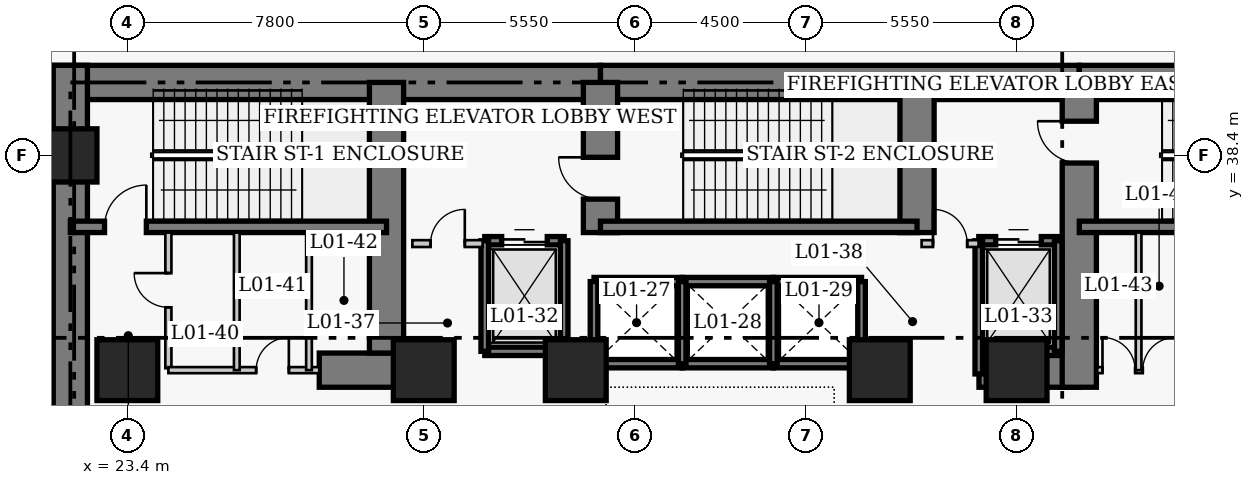
"""IFC4 building model, lengths in metres.
Left out: names, types, materials, properties, quantities, classifications, styles, units other than length and angle.
Written with IfcOpenShell. Run it as: python <this file> out.ifc"""

import sys

from ifc_helpers import new_model, si_unit, direction, frame, frame_2d, origin, origin_2d, place, context, subcontext, project, spatial, rectangle, extrude, element, fill, save


model = new_model("IFC4")
c1 = context("Model", 3, precision=1e-05, world=origin(), true_north=direction((0.0, 1.0)))
c2 = subcontext(c1, "Body", "Model", "MODEL_VIEW")
j1 = project(units=[si_unit("LENGTHUNIT", "METRE"), si_unit("PLANEANGLEUNIT", "RADIAN")], contexts=[c1])
p1 = place(None, origin())
s1 = spatial("IfcSite", under=j1, at=p1, CompositionType="ELEMENT")
p2 = place(p1, origin())
s2 = spatial("IfcBuilding", under=s1, at=p2, CompositionType="ELEMENT")
p3 = place(p2, frame((0.0, 0.0, 5.4)))
s3 = spatial("IfcBuildingStorey", under=s2, at=p3, CompositionType="ELEMENT", Elevation=5.4)
p4 = place(p3, frame((21.45, 40.32, 0.0), z_axis=(0.0, 0.0, 1.0), x_axis=(1.0, 0.0, 0.0)))
e1 = element("IfcWall", 1, at=p4, inside=s3, PredefinedType="SHEAR", context=c2, shape_type="SweptSolid", body=[
    extrude(rectangle(XDim=14.4, YDim=0.9, at=frame_2d((7.2, 0.0))), origin(), (0.0, 0.0, 1.0), 5.0),
])
p5 = place(p3, frame((35.85, 40.32, 0.0), z_axis=(0.0, 0.0, 1.0), x_axis=(1.0, 0.0, 0.0)))
e2 = element("IfcWall", 2, at=p5, inside=s3, PredefinedType="SHEAR", context=c2, shape_type="SweptSolid", body=[
    extrude(rectangle(XDim=12.6, YDim=0.9, at=frame_2d((6.3, 0.0))), origin(), (0.0, 0.0, 1.0), 5.0),
])
p6 = place(p3, frame((48.45, 40.32, 0.0), z_axis=(0.0, 0.0, 1.0), x_axis=(1.0, 0.0, 0.0)))
e3 = element("IfcWall", 3, at=p6, inside=s3, PredefinedType="SHEAR", context=c2, shape_type="SweptSolid", body=[
    extrude(rectangle(XDim=8.97, YDim=0.9, at=frame_2d((4.485, 0.0))), origin(), (0.0, 0.0, 1.0), 5.0),
])
p7 = place(p3, frame((21.9, 27.05, 0.0), z_axis=(0.0, 0.0, 1.0), x_axis=(0.0, 1.0, 0.0)))
e4 = element("IfcWall", 4, at=p7, inside=s3, PredefinedType="SHEAR", context=c2, shape_type="SweptSolid", body=[
    extrude(rectangle(XDim=13.72, YDim=0.9, at=frame_2d((6.86, 0.0))), origin(), (0.0, 0.0, 1.0), 5.0),
])
p8 = place(p3, frame((28.45, 32.75, 0.0), z_axis=(0.0, 0.0, 1.0), x_axis=(1.0, 0.0, 0.0)))
e5 = element("IfcWall", 5, at=p8, inside=s3, PredefinedType="SHEAR", context=c2, shape_type="SweptSolid", body=[
    extrude(rectangle(XDim=2.4, YDim=0.9, at=frame_2d((1.2, 0.0))), origin(), (0.0, 0.0, 1.0), 5.0),
])
p9 = place(p3, frame((45.81, 32.75, 0.0), z_axis=(0.0, 0.0, 1.0), x_axis=(1.0, 0.0, 0.0)))
e6 = element("IfcWall", 6, at=p9, inside=s3, PredefinedType="SHEAR", context=c2, shape_type="SweptSolid", body=[
    extrude(rectangle(XDim=2.64, YDim=0.9, at=frame_2d((1.32, 0.0))), origin(), (0.0, 0.0, 1.0), 5.0),
])
p10 = place(p3, frame((30.22, 33.2, 0.0), z_axis=(0.0, 0.0, 1.0), x_axis=(0.0, 1.0, 0.0)))
e7 = element("IfcWall", 7, at=p10, inside=s3, PredefinedType="SHEAR", context=c2, shape_type="SweptSolid", body=[
    extrude(rectangle(XDim=7.12, YDim=0.9, at=frame_2d((3.56, 0.0))), origin(), (0.0, 0.0, 1.0), 5.0),
])
p11 = place(p3, frame((35.85, 36.37, 0.0), z_axis=(0.0, 0.0, 1.0), x_axis=(0.0, 1.0, 0.0)))
e8 = element("IfcWall", 8, at=p11, inside=s3, PredefinedType="SHEAR", context=c2, shape_type="SweptSolid", body=[
    extrude(rectangle(XDim=3.95, YDim=0.9, at=frame_2d((1.975, 0.0))), origin(), (0.0, 0.0, 1.0), 5.0),
])
p12 = place(p11, frame((0.88, 0.0, 0.0)))
e9 = element("IfcOpeningElement", 9, at=p12, cuts=e8, PredefinedType="OPENING", context=c2, shape_type="SweptSolid", body=[
    extrude(rectangle(XDim=1.1, YDim=2.15, at=frame_2d((0.55, 1.075))), frame((0.0, 0.46, 0.0), z_axis=(0.0, -1.0, 0.0), x_axis=(1.0, 0.0, 0.0)), (0.0, 0.0, 1.0), 0.92),
])
p13 = place(p3, frame((44.18, 36.37, 0.0), z_axis=(0.0, 0.0, 1.0), x_axis=(0.0, 1.0, 0.0)))
e10 = element("IfcWall", 10, at=p13, inside=s3, PredefinedType="SHEAR", context=c2, shape_type="SweptSolid", body=[
    extrude(rectangle(XDim=3.95, YDim=0.9, at=frame_2d((1.975, 0.0))), origin(), (0.0, 0.0, 1.0), 5.0),
])
p14 = place(p3, frame((48.45, 32.3, 0.0), z_axis=(0.0, 0.0, 1.0), x_axis=(0.0, 1.0, 0.0)))
e11 = element("IfcWall", 11, at=p14, inside=s3, PredefinedType="SHEAR", context=c2, shape_type="SweptSolid", body=[
    extrude(rectangle(XDim=8.02, YDim=0.9, at=frame_2d((4.01, 0.0))), origin(), (0.0, 0.0, 1.0), 5.0),
])
p15 = place(p14, frame((5.9, 0.0, 0.0)))
e12 = element("IfcOpeningElement", 12, at=p15, cuts=e11, PredefinedType="OPENING", context=c2, shape_type="SweptSolid", body=[
    extrude(rectangle(XDim=1.1, YDim=2.15, at=frame_2d((0.55, 1.075))), frame((0.0, 0.46, 0.0), z_axis=(0.0, -1.0, 0.0), x_axis=(1.0, 0.0, 0.0)), (0.0, 0.0, 1.0), 0.92),
])
p16 = place(p3, frame((21.9, 36.52, 0.0), z_axis=(0.0, 0.0, 1.0), x_axis=(1.0, 0.0, 0.0)))
e13 = element("IfcWall", 13, at=p16, inside=s3, PredefinedType="SHEAR", context=c2, shape_type="SweptSolid", body=[
    extrude(rectangle(XDim=8.32, YDim=0.3, at=frame_2d((4.16, 0.0))), origin(), (0.0, 0.0, 1.0), 5.0),
])
p17 = place(p16, frame((0.9, 0.0, 0.0)))
e14 = element("IfcOpeningElement", 14, at=p17, cuts=e13, PredefinedType="OPENING", context=c2, shape_type="SweptSolid", body=[
    extrude(rectangle(XDim=1.1, YDim=2.15, at=frame_2d((0.55, 1.075))), frame((0.0, 0.16, 0.0), z_axis=(0.0, -1.0, 0.0), x_axis=(1.0, 0.0, 0.0)), (0.0, 0.0, 1.0), 0.32),
])
p18 = place(p3, frame((35.85, 36.52, 0.0), z_axis=(0.0, 0.0, 1.0), x_axis=(1.0, 0.0, 0.0)))
e15 = element("IfcWall", 15, at=p18, inside=s3, PredefinedType="SHEAR", context=c2, shape_type="SweptSolid", body=[
    extrude(rectangle(XDim=8.33, YDim=0.3, at=frame_2d((4.165, 0.0))), origin(), (0.0, 0.0, 1.0), 5.0),
])
p19 = place(p3, frame((48.45, 36.52, 0.0), z_axis=(0.0, 0.0, 1.0), x_axis=(1.0, 0.0, 0.0)))
e16 = element("IfcWall", 16, at=p19, inside=s3, PredefinedType="SHEAR", context=c2, shape_type="SweptSolid", body=[
    extrude(rectangle(XDim=8.52, YDim=0.3, at=frame_2d((4.26, 0.0))), origin(), (0.0, 0.0, 1.0), 5.0),
])
p20 = place(p3, frame((21.9, 38.4, 0.0), z_axis=(0.0, 0.0, 1.0), x_axis=(1.0, 0.0, 0.0)))
e17 = element("IfcColumn", 17, at=p20, inside=s3, PredefinedType="COLUMN", context=c2, shape_type="SweptSolid", body=[
    extrude(rectangle(XDim=1.4, YDim=1.4, at=origin_2d()), origin(), (0.0, 0.0, 1.0), 5.0),
])
for number, where, z_axis, x_axis in (
    (18, (23.4, 32.75, 0.0), (0.0, 0.0, 1.0), (1.0, 0.0, 0.0)),
    (19, (31.2, 32.75, 0.0), (0.0, 0.0, 1.0), (1.0, 0.0, 0.0)),
    (20, (35.2, 32.75, 0.0), (0.0, 0.0, 1.0), (1.0, 0.0, 0.0)),
    (21, (43.2, 32.75, 0.0), (0.0, 0.0, 1.0), (1.0, 0.0, 0.0)),
    (22, (46.8, 32.75, 0.0), (0.0, 0.0, 1.0), (1.0, 0.0, 0.0)),
):
    element("IfcColumn", number, at=place(p3, frame(where, z_axis=z_axis, x_axis=x_axis)), inside=s3, PredefinedType="COLUMN", context=c2, shape_type="SweptSolid", body=[
        extrude(rectangle(XDim=1.6, YDim=1.6, at=origin_2d()), origin(), (0.0, 0.0, 1.0), 5.0),
    ])
for number, where, z_axis, x_axis in (
    (23, (35.68, 35.08, 0.0), (0.0, 0.0, 1.0), (1.0, 0.0, 0.0)),
    (24, (35.68, 32.92, 0.0), (0.0, 0.0, 1.0), (1.0, 0.0, 0.0)),
):
    element("IfcWall", number, at=place(p3, frame(where, z_axis=z_axis, x_axis=x_axis)), inside=s3, PredefinedType="SHEAR", context=c2, shape_type="SweptSolid", body=[
        extrude(rectangle(XDim=2.32, YDim=0.22, at=frame_2d((1.16, 0.0))), origin(), (0.0, 0.0, 1.0), 5.0),
    ])
p21 = place(p3, frame((35.68, 32.92, 0.0), z_axis=(0.0, 0.0, 1.0), x_axis=(0.0, 1.0, 0.0)))
e25 = element("IfcWall", 25, at=p21, inside=s3, PredefinedType="SHEAR", context=c2, shape_type="SweptSolid", body=[
    extrude(rectangle(XDim=2.16, YDim=0.2, at=frame_2d((1.08, 0.0))), origin(), (0.0, 0.0, 1.0), 5.0),
])
for number, where, z_axis, x_axis in (
    (26, (38.0, 35.08, 0.0), (0.0, 0.0, 1.0), (1.0, 0.0, 0.0)),
    (27, (38.0, 32.92, 0.0), (0.0, 0.0, 1.0), (1.0, 0.0, 0.0)),
):
    element("IfcWall", number, at=place(p3, frame(where, z_axis=z_axis, x_axis=x_axis)), inside=s3, PredefinedType="SHEAR", context=c2, shape_type="SweptSolid", body=[
        extrude(rectangle(XDim=2.4, YDim=0.22, at=frame_2d((1.2, 0.0))), origin(), (0.0, 0.0, 1.0), 5.0),
    ])
p22 = place(p3, frame((38.0, 32.92, 0.0), z_axis=(0.0, 0.0, 1.0), x_axis=(0.0, 1.0, 0.0)))
e28 = element("IfcWall", 28, at=p22, inside=s3, PredefinedType="SHEAR", context=c2, shape_type="SweptSolid", body=[
    extrude(rectangle(XDim=2.16, YDim=0.2, at=frame_2d((1.08, 0.0))), origin(), (0.0, 0.0, 1.0), 5.0),
])
for number, where, z_axis, x_axis in (
    (29, (40.4, 35.08, 0.0), (0.0, 0.0, 1.0), (1.0, 0.0, 0.0)),
    (30, (40.4, 32.92, 0.0), (0.0, 0.0, 1.0), (1.0, 0.0, 0.0)),
):
    element("IfcWall", number, at=place(p3, frame(where, z_axis=z_axis, x_axis=x_axis)), inside=s3, PredefinedType="SHEAR", context=c2, shape_type="SweptSolid", body=[
        extrude(rectangle(XDim=2.32, YDim=0.22, at=frame_2d((1.16, 0.0))), origin(), (0.0, 0.0, 1.0), 5.0),
    ])
for number, where, z_axis, x_axis in (
    (31, (40.4, 32.92, 0.0), (0.0, 0.0, 1.0), (0.0, 1.0, 0.0)),
    (32, (42.72, 32.92, 0.0), (0.0, 0.0, 1.0), (0.0, 1.0, 0.0)),
):
    element("IfcWall", number, at=place(p3, frame(where, z_axis=z_axis, x_axis=x_axis)), inside=s3, PredefinedType="SHEAR", context=c2, shape_type="SweptSolid", body=[
        extrude(rectangle(XDim=2.16, YDim=0.2, at=frame_2d((1.08, 0.0))), origin(), (0.0, 0.0, 1.0), 5.0),
    ])
p23 = place(p3, frame((32.805, 36.155, 0.0), z_axis=(0.0, 0.0, 1.0), x_axis=(1.0, 0.0, 0.0)))
e33 = element("IfcWall", 33, at=p23, inside=s3, PredefinedType="SHEAR", context=c2, shape_type="SweptSolid", body=[
    extrude(rectangle(XDim=2.09, YDim=0.22, at=frame_2d((1.045, 0.0))), origin(), (0.0, 0.0, 1.0), 5.0),
])
p24 = place(p23, frame((0.445, 0.0, 0.0)))
e34 = element("IfcOpeningElement", 34, at=p24, cuts=e33, PredefinedType="OPENING", context=c2, shape_type="SweptSolid", body=[
    extrude(rectangle(XDim=1.2, YDim=2.15, at=frame_2d((0.6, 1.075))), frame((0.0, 0.12, 0.0), z_axis=(0.0, -1.0, 0.0), x_axis=(1.0, 0.0, 0.0)), (0.0, 0.0, 1.0), 0.24),
])
p25 = place(p3, frame((32.805, 33.245, 0.0), z_axis=(0.0, 0.0, 1.0), x_axis=(1.0, 0.0, 0.0)))
e35 = element("IfcWall", 35, at=p25, inside=s3, PredefinedType="SHEAR", context=c2, shape_type="SweptSolid", body=[
    extrude(rectangle(XDim=2.09, YDim=0.22, at=frame_2d((1.045, 0.0))), origin(), (0.0, 0.0, 1.0), 5.0),
])
for number, where, z_axis, x_axis in (
    (36, (32.805, 33.245, 0.0), (0.0, 0.0, 1.0), (0.0, 1.0, 0.0)),
    (37, (34.895, 33.245, 0.0), (0.0, 0.0, 1.0), (0.0, 1.0, 0.0)),
):
    element("IfcWall", number, at=place(p3, frame(where, z_axis=z_axis, x_axis=x_axis)), inside=s3, PredefinedType="SHEAR", context=c2, shape_type="SweptSolid", body=[
        extrude(rectangle(XDim=2.91, YDim=0.2, at=frame_2d((1.455, 0.0))), origin(), (0.0, 0.0, 1.0), 5.0),
    ])
p26 = place(p3, frame((45.805, 36.155, 0.0), z_axis=(0.0, 0.0, 1.0), x_axis=(1.0, 0.0, 0.0)))
e38 = element("IfcWall", 38, at=p26, inside=s3, PredefinedType="SHEAR", context=c2, shape_type="SweptSolid", body=[
    extrude(rectangle(XDim=2.09, YDim=0.22, at=frame_2d((1.045, 0.0))), origin(), (0.0, 0.0, 1.0), 5.0),
])
p27 = place(p26, frame((0.445, 0.0, 0.0)))
e39 = element("IfcOpeningElement", 39, at=p27, cuts=e38, PredefinedType="OPENING", context=c2, shape_type="SweptSolid", body=[
    extrude(rectangle(XDim=1.2, YDim=2.15, at=frame_2d((0.6, 1.075))), frame((0.0, 0.12, 0.0), z_axis=(0.0, -1.0, 0.0), x_axis=(1.0, 0.0, 0.0)), (0.0, 0.0, 1.0), 0.24),
])
p28 = place(p3, frame((45.805, 33.245, 0.0), z_axis=(0.0, 0.0, 1.0), x_axis=(1.0, 0.0, 0.0)))
e40 = element("IfcWall", 40, at=p28, inside=s3, PredefinedType="SHEAR", context=c2, shape_type="SweptSolid", body=[
    extrude(rectangle(XDim=2.09, YDim=0.22, at=frame_2d((1.045, 0.0))), origin(), (0.0, 0.0, 1.0), 5.0),
])
p29 = place(p3, frame((45.805, 32.65, 0.0), z_axis=(0.0, 0.0, 1.0), x_axis=(0.0, 1.0, 0.0)))
e41 = element("IfcWall", 41, at=p29, inside=s3, PredefinedType="SHEAR", context=c2, shape_type="SweptSolid", body=[
    extrude(rectangle(XDim=3.505, YDim=0.2, at=frame_2d((1.752, 0.0))), origin(), (0.0, 0.0, 1.0), 5.0),
])
p30 = place(p3, frame((47.895, 33.245, 0.0), z_axis=(0.0, 0.0, 1.0), x_axis=(0.0, 1.0, 0.0)))
e42 = element("IfcWall", 42, at=p30, inside=s3, PredefinedType="SHEAR", context=c2, shape_type="SweptSolid", body=[
    extrude(rectangle(XDim=2.91, YDim=0.2, at=frame_2d((1.455, 0.0))), origin(), (0.0, 0.0, 1.0), 5.0),
])
p31 = place(p3, frame((30.9, 36.08, 0.0), z_axis=(0.0, 0.0, 1.0), x_axis=(1.0, 0.0, 0.0)))
e43 = element("IfcWall", 43, at=p31, inside=s3, PredefinedType="PARTITIONING", context=c2, shape_type="SweptSolid", body=[
    extrude(rectangle(XDim=1.85, YDim=0.18, at=frame_2d((0.925, 0.0))), origin(), (0.0, 0.0, 1.0), 4.65),
])
p32 = place(p31, frame((0.48, 0.0, 0.0)))
e44 = element("IfcOpeningElement", 44, at=p32, cuts=e43, PredefinedType="OPENING", context=c2, shape_type="SweptSolid", body=[
    extrude(rectangle(XDim=0.9, YDim=2.15, at=frame_2d((0.45, 1.075))), frame((0.0, 0.1, 0.0), z_axis=(0.0, -1.0, 0.0), x_axis=(1.0, 0.0, 0.0)), (0.0, 0.0, 1.0), 0.2),
])
p33 = place(p3, frame((44.3, 36.08, 0.0), z_axis=(0.0, 0.0, 1.0), x_axis=(1.0, 0.0, 0.0)))
e45 = element("IfcWall", 45, at=p33, inside=s3, PredefinedType="PARTITIONING", context=c2, shape_type="SweptSolid", body=[
    extrude(rectangle(XDim=1.5, YDim=0.18, at=frame_2d((0.75, 0.0))), origin(), (0.0, 0.0, 1.0), 4.65),
])
p34 = place(p33, frame((0.3, 0.0, 0.0)))
e46 = element("IfcOpeningElement", 46, at=p34, cuts=e45, PredefinedType="OPENING", context=c2, shape_type="SweptSolid", body=[
    extrude(rectangle(XDim=0.9, YDim=2.15, at=frame_2d((0.45, 1.075))), frame((0.0, 0.1, 0.0), z_axis=(0.0, -1.0, 0.0), x_axis=(1.0, 0.0, 0.0)), (0.0, 0.0, 1.0), 0.2),
])
p35 = place(p3, frame((24.48, 32.8, 0.0), z_axis=(0.0, 0.0, 1.0), x_axis=(0.0, 1.0, 0.0)))
e47 = element("IfcWall", 47, at=p35, inside=s3, PredefinedType="PARTITIONING", context=c2, shape_type="SweptSolid", body=[
    extrude(rectangle(XDim=3.57, YDim=0.16, at=frame_2d((1.785, 0.0))), origin(), (0.0, 0.0, 1.0), 4.65),
])
p36 = place(p35, frame((1.604, 0.0, 0.0)))
e48 = element("IfcOpeningElement", 48, at=p36, cuts=e47, PredefinedType="OPENING", context=c2, shape_type="SweptSolid", body=[
    extrude(rectangle(XDim=0.9, YDim=2.1, at=frame_2d((0.45, 1.05))), frame((0.0, 0.09, 0.0), z_axis=(0.0, -1.0, 0.0), x_axis=(1.0, 0.0, 0.0)), (0.0, 0.0, 1.0), 0.18),
])
p37 = place(p3, frame((24.48, 32.75, 0.0), z_axis=(0.0, 0.0, 1.0), x_axis=(1.0, 0.0, 0.0)))
e49 = element("IfcWall", 49, at=p37, inside=s3, PredefinedType="PARTITIONING", context=c2, shape_type="SweptSolid", body=[
    extrude(rectangle(XDim=3.97, YDim=0.16, at=frame_2d((1.985, 0.0))), origin(), (0.0, 0.0, 1.0), 4.65),
])
p38 = place(p37, frame((2.31, 0.0, 0.0)))
e50 = element("IfcOpeningElement", 50, at=p38, cuts=e49, PredefinedType="OPENING", context=c2, shape_type="SweptSolid", body=[
    extrude(rectangle(XDim=0.86, YDim=2.05, at=frame_2d((0.43, 1.025))), frame((0.0, 0.09, 0.0), z_axis=(0.0, -1.0, 0.0), x_axis=(1.0, 0.0, 0.0)), (0.0, 0.0, 1.0), 0.18),
])
p39 = place(p3, frame((48.92, 32.75, 0.0), z_axis=(0.0, 0.0, 1.0), x_axis=(1.0, 0.0, 0.0)))
e51 = element("IfcWall", 51, at=p39, inside=s3, PredefinedType="PARTITIONING", context=c2, shape_type="SweptSolid", body=[
    extrude(rectangle(XDim=2.2, YDim=0.16, at=frame_2d((1.1, 0.0))), origin(), (0.0, 0.0, 1.0), 4.65),
])
p40 = place(p39, frame((0.14, 0.0, 0.0)))
e52 = element("IfcOpeningElement", 52, at=p40, cuts=e51, PredefinedType="OPENING", context=c2, shape_type="SweptSolid", body=[
    extrude(rectangle(XDim=0.86, YDim=2.05, at=frame_2d((0.43, 1.025))), frame((0.0, 0.09, 0.0), z_axis=(0.0, -1.0, 0.0), x_axis=(1.0, 0.0, 0.0)), (0.0, 0.0, 1.0), 0.18),
])
p41 = place(p39, frame((1.2, 0.0, 0.0)))
e53 = element("IfcOpeningElement", 53, at=p41, cuts=e51, PredefinedType="OPENING", context=c2, shape_type="SweptSolid", body=[
    extrude(rectangle(XDim=0.86, YDim=2.05, at=frame_2d((0.43, 1.025))), frame((0.0, 0.09, 0.0), z_axis=(0.0, -1.0, 0.0), x_axis=(1.0, 0.0, 0.0)), (0.0, 0.0, 1.0), 0.18),
])
for number, where, z_axis, x_axis in (
    (54, (26.28, 32.75, 0.0), (0.0, 0.0, 1.0), (0.0, 1.0, 0.0)),
    (55, (28.18, 32.75, 0.0), (0.0, 0.0, 1.0), (0.0, 1.0, 0.0)),
    (56, (50.01, 32.75, 0.0), (0.0, 0.0, 1.0), (0.0, 1.0, 0.0)),
):
    element("IfcWall", number, at=place(p3, frame(where, z_axis=z_axis, x_axis=x_axis)), inside=s3, PredefinedType="PARTITIONING", context=c2, shape_type="SweptSolid", body=[
        extrude(rectangle(XDim=3.62, YDim=0.15, at=frame_2d((1.81, 0.0))), origin(), (0.0, 0.0, 1.0), 4.65),
    ])
p42 = place(p24, origin())
e57 = element("IfcDoor", 57, at=p42, inside=s3, OperationType="DOUBLE_DOOR_SLIDING", PredefinedType="DOOR", context=c2, shape_type="SweptSolid", body=[
    extrude(rectangle(XDim=1.2, YDim=2.15, at=frame_2d((0.6, 1.075))), frame((0.0, 0.025, 0.0), z_axis=(0.0, -1.0, 0.0), x_axis=(1.0, 0.0, 0.0)), (0.0, 0.0, 1.0), 0.05),
])
fill(e34, e57)
p43 = place(p27, origin())
e58 = element("IfcDoor", 58, at=p43, inside=s3, OperationType="DOUBLE_DOOR_SLIDING", PredefinedType="DOOR", context=c2, shape_type="SweptSolid", body=[
    extrude(rectangle(XDim=1.2, YDim=2.15, at=frame_2d((0.6, 1.075))), frame((0.0, 0.025, 0.0), z_axis=(0.0, -1.0, 0.0), x_axis=(1.0, 0.0, 0.0)), (0.0, 0.0, 1.0), 0.05),
])
fill(e39, e58)
p44 = place(p32, origin())
e59 = element("IfcDoor", 59, at=p44, inside=s3, OperationType="SINGLE_SWING_RIGHT", PredefinedType="DOOR", context=c2, shape_type="SweptSolid", body=[
    extrude(rectangle(XDim=0.9, YDim=2.15, at=frame_2d((0.45, 1.075))), frame((0.0, 0.025, 0.0), z_axis=(0.0, -1.0, 0.0), x_axis=(1.0, 0.0, 0.0)), (0.0, 0.0, 1.0), 0.05),
])
fill(e44, e59)
p45 = place(p34, origin())
e60 = element("IfcDoor", 60, at=p45, inside=s3, OperationType="SINGLE_SWING_LEFT", PredefinedType="DOOR", context=c2, shape_type="SweptSolid", body=[
    extrude(rectangle(XDim=0.9, YDim=2.15, at=frame_2d((0.45, 1.075))), frame((0.0, 0.025, 0.0), z_axis=(0.0, -1.0, 0.0), x_axis=(1.0, 0.0, 0.0)), (0.0, 0.0, 1.0), 0.05),
])
fill(e46, e60)
p46 = place(p36, origin())
e61 = element("IfcDoor", 61, at=p46, inside=s3, OperationType="SINGLE_SWING_RIGHT", PredefinedType="DOOR", context=c2, shape_type="SweptSolid", body=[
    extrude(rectangle(XDim=0.9, YDim=2.1, at=frame_2d((0.45, 1.05))), frame((0.0, 0.025, 0.0), z_axis=(0.0, -1.0, 0.0), x_axis=(1.0, 0.0, 0.0)), (0.0, 0.0, 1.0), 0.05),
])
fill(e48, e61)
p47 = place(p38, origin())
e62 = element("IfcDoor", 62, at=p47, inside=s3, OperationType="SINGLE_SWING_RIGHT", PredefinedType="DOOR", context=c2, shape_type="SweptSolid", body=[
    extrude(rectangle(XDim=0.86, YDim=2.05, at=frame_2d((0.43, 1.025))), frame((0.0, 0.025, 0.0), z_axis=(0.0, -1.0, 0.0), x_axis=(1.0, 0.0, 0.0)), (0.0, 0.0, 1.0), 0.05),
])
fill(e50, e62)
p48 = place(p40, origin())
e63 = element("IfcDoor", 63, at=p48, inside=s3, OperationType="SINGLE_SWING_LEFT", PredefinedType="DOOR", context=c2, shape_type="SweptSolid", body=[
    extrude(rectangle(XDim=0.86, YDim=2.05, at=frame_2d((0.43, 1.025))), frame((0.0, 0.025, 0.0), z_axis=(0.0, -1.0, 0.0), x_axis=(1.0, 0.0, 0.0)), (0.0, 0.0, 1.0), 0.05),
])
fill(e52, e63)
p49 = place(p41, origin())
e64 = element("IfcDoor", 64, at=p49, inside=s3, OperationType="SINGLE_SWING_RIGHT", PredefinedType="DOOR", context=c2, shape_type="SweptSolid", body=[
    extrude(rectangle(XDim=0.86, YDim=2.05, at=frame_2d((0.43, 1.025))), frame((0.0, 0.025, 0.0), z_axis=(0.0, -1.0, 0.0), x_axis=(1.0, 0.0, 0.0)), (0.0, 0.0, 1.0), 0.05),
])
fill(e53, e64)
p50 = place(p17, origin())
e65 = element("IfcDoor", 65, at=p50, inside=s3, OperationType="SINGLE_SWING_RIGHT", PredefinedType="DOOR", context=c2, shape_type="SweptSolid", body=[
    extrude(rectangle(XDim=1.1, YDim=2.15, at=frame_2d((0.55, 1.075))), frame((0.0, 0.025, 0.0), z_axis=(0.0, -1.0, 0.0), x_axis=(1.0, 0.0, 0.0)), (0.0, 0.0, 1.0), 0.05),
])
fill(e14, e65)
p51 = place(p12, origin())
e66 = element("IfcDoor", 66, at=p51, inside=s3, OperationType="SINGLE_SWING_RIGHT", PredefinedType="DOOR", context=c2, shape_type="SweptSolid", body=[
    extrude(rectangle(XDim=1.1, YDim=2.15, at=frame_2d((0.55, 1.075))), frame((0.0, 0.025, 0.0), z_axis=(0.0, -1.0, 0.0), x_axis=(1.0, 0.0, 0.0)), (0.0, 0.0, 1.0), 0.05),
])
fill(e9, e66)
p52 = place(p15, origin())
e67 = element("IfcDoor", 67, at=p52, inside=s3, OperationType="SINGLE_SWING_RIGHT", PredefinedType="DOOR", context=c2, shape_type="SweptSolid", body=[
    extrude(rectangle(XDim=1.1, YDim=2.15, at=frame_2d((0.55, 1.075))), frame((0.0, 0.025, 0.0), z_axis=(0.0, -1.0, 0.0), x_axis=(1.0, 0.0, 0.0)), (0.0, 0.0, 1.0), 0.05),
])
fill(e12, e67)
save(model, sys.argv[1])
